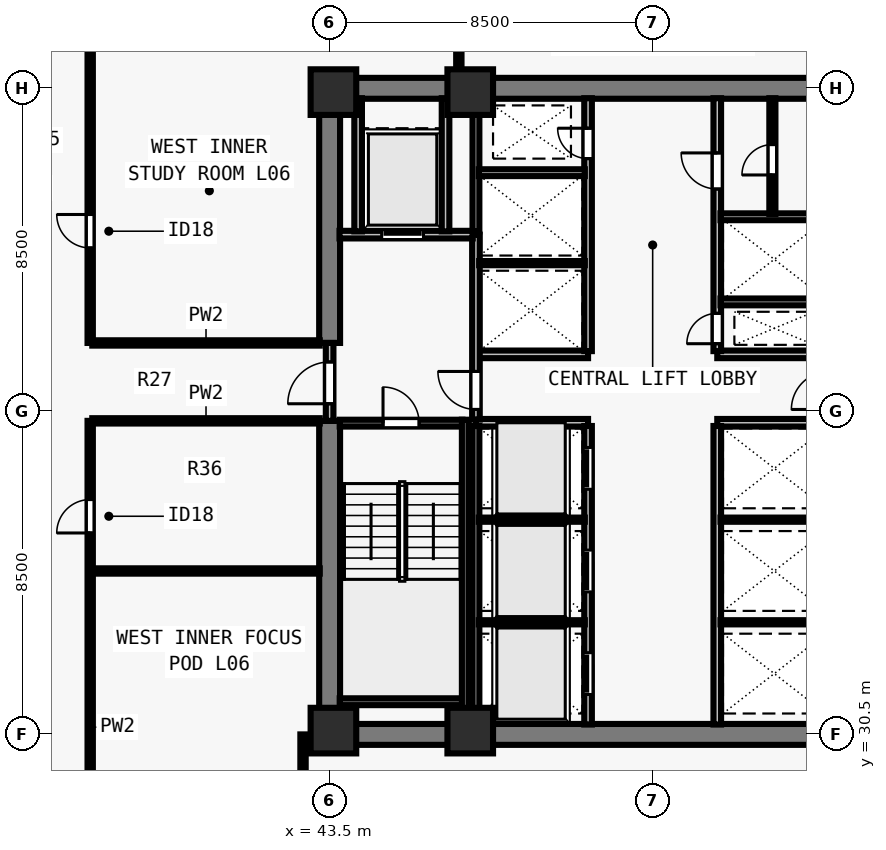
"""IFC4 building model, lengths in metres.
Left out: names, types, materials, properties, quantities, classifications, styles, units other than length and angle.
Written with IfcOpenShell. Run it as: python <this file> out.ifc"""

import sys

from ifc_helpers import new_model, si_unit, direction, frame, frame_2d, origin, origin_2d, place, context, subcontext, project, spatial, rectangle, extrude, element, fill, save


model = new_model("IFC4")
c1 = context("Model", 3, precision=1e-05, world=origin(), true_north=direction((0.0, 1.0)))
c2 = subcontext(c1, "Body", "Model", "MODEL_VIEW")
j1 = project(units=[si_unit("LENGTHUNIT", "METRE"), si_unit("PLANEANGLEUNIT", "RADIAN")], contexts=[c1])
p1 = place(None, origin())
s1 = spatial("IfcSite", under=j1, at=p1, CompositionType="ELEMENT")
p2 = place(p1, origin())
s2 = spatial("IfcBuilding", under=s1, at=p2, CompositionType="ELEMENT")
p3 = place(p2, frame((0.0, 0.0, 27.0)))
s3 = spatial("IfcBuildingStorey", under=s2, at=p3, CompositionType="ELEMENT", Elevation=27.0)
for number, where, z_axis, x_axis in (
    (1, (43.6, 30.6, 0.0), (0.0, 0.0, 1.0), (1.0, 0.0, 0.0)),
    (2, (47.2, 30.6, 0.0), (0.0, 0.0, 1.0), (1.0, 0.0, 0.0)),
    (3, (43.6, 47.4, 0.0), (0.0, 0.0, 1.0), (1.0, 0.0, 0.0)),
    (4, (47.2, 47.4, 0.0), (0.0, 0.0, 1.0), (1.0, 0.0, 0.0)),
):
    element("IfcColumn", number, at=place(p3, frame(where, z_axis=z_axis, x_axis=x_axis)), inside=s3, PredefinedType="COLUMN", context=c2, shape_type="SweptSolid", body=[
        extrude(rectangle(XDim=1.2, YDim=1.2, at=origin_2d()), origin(), (0.0, 0.0, 1.0), 3.5),
    ])
for number, where, z_axis, x_axis in (
    (5, (43.225, 30.5, 0.0), (0.0, 0.0, 1.0), (1.0, 0.0, 0.0)),
    (6, (43.225, 47.5, 0.0), (0.0, 0.0, 1.0), (1.0, 0.0, 0.0)),
):
    element("IfcWall", number, at=place(p3, frame(where, z_axis=z_axis, x_axis=x_axis)), inside=s3, PredefinedType="SHEAR", context=c2, shape_type="SweptSolid", body=[
        extrude(rectangle(XDim=17.55, YDim=0.55, at=frame_2d((8.775, 0.0))), origin(), (0.0, 0.0, 1.0), 3.28),
    ])
p4 = place(p3, frame((43.5, 30.765, 0.0), z_axis=(0.0, 0.0, 1.0), x_axis=(0.0, 1.0, 0.0)))
e7 = element("IfcWall", 7, at=p4, inside=s3, PredefinedType="SHEAR", context=c2, shape_type="SweptSolid", body=[
    extrude(rectangle(XDim=7.985, YDim=0.55, at=frame_2d((3.993, 0.0))), origin(), (0.0, 0.0, 1.0), 3.28),
])
p5 = place(p3, frame((43.5, 40.8, 0.0), z_axis=(0.0, 0.0, 1.0), x_axis=(0.0, 1.0, 0.0)))
e8 = element("IfcWall", 8, at=p5, inside=s3, PredefinedType="SHEAR", context=c2, shape_type="SweptSolid", body=[
    extrude(rectangle(XDim=6.435, YDim=0.55, at=frame_2d((3.218, 0.0))), origin(), (0.0, 0.0, 1.0), 3.28),
])
for number, where, z_axis, x_axis in (
    (9, (47.35, 38.7, 0.0), (0.0, 0.0, 1.0), (1.0, 0.0, 0.0)),
    (10, (47.35, 40.5, 0.0), (0.0, 0.0, 1.0), (1.0, 0.0, 0.0)),
    (11, (53.7, 38.7, 0.0), (0.0, 0.0, 1.0), (1.0, 0.0, 0.0)),
    (12, (53.7, 40.5, 0.0), (0.0, 0.0, 1.0), (1.0, 0.0, 0.0)),
):
    element("IfcWall", number, at=place(p3, frame(where, z_axis=z_axis, x_axis=x_axis)), inside=s3, PredefinedType="SOLIDWALL", context=c2, shape_type="SweptSolid", body=[
        extrude(rectangle(XDim=2.95, YDim=0.2, at=frame_2d((1.475, 0.0))), origin(), (0.0, 0.0, 1.0), 3.28),
    ])
p6 = place(p3, frame((50.3, 30.76, 0.0), z_axis=(0.0, 0.0, 1.0), x_axis=(0.0, 1.0, 0.0)))
e13 = element("IfcWall", 13, at=p6, inside=s3, PredefinedType="SOLIDWALL", context=c2, shape_type="SweptSolid", body=[
    extrude(rectangle(XDim=7.855, YDim=0.2, at=frame_2d((3.927, 0.0))), origin(), (0.0, 0.0, 1.0), 3.28),
])
p7 = place(p6, frame((0.79, 0.0, 0.0)))
e14 = element("IfcOpeningElement", 14, at=p7, cuts=e13, PredefinedType="OPENING", context=c2, shape_type="SweptSolid", body=[
    extrude(rectangle(XDim=1.1, YDim=2.2, at=frame_2d((0.55, 1.1))), frame((0.0, 0.11, 0.0), z_axis=(0.0, -1.0, 0.0), x_axis=(1.0, 0.0, 0.0)), (0.0, 0.0, 1.0), 0.22),
])
p8 = place(p6, frame((3.49, 0.0, 0.0)))
e15 = element("IfcOpeningElement", 15, at=p8, cuts=e13, PredefinedType="OPENING", context=c2, shape_type="SweptSolid", body=[
    extrude(rectangle(XDim=1.1, YDim=2.2, at=frame_2d((0.55, 1.1))), frame((0.0, 0.11, 0.0), z_axis=(0.0, -1.0, 0.0), x_axis=(1.0, 0.0, 0.0)), (0.0, 0.0, 1.0), 0.22),
])
p9 = place(p6, frame((6.19, 0.0, 0.0)))
e16 = element("IfcOpeningElement", 16, at=p9, cuts=e13, PredefinedType="OPENING", context=c2, shape_type="SweptSolid", body=[
    extrude(rectangle(XDim=1.1, YDim=2.2, at=frame_2d((0.55, 1.1))), frame((0.0, 0.11, 0.0), z_axis=(0.0, -1.0, 0.0), x_axis=(1.0, 0.0, 0.0)), (0.0, 0.0, 1.0), 0.22),
])
p10 = place(p3, frame((53.7, 30.76, 0.0), z_axis=(0.0, 0.0, 1.0), x_axis=(0.0, 1.0, 0.0)))
e17 = element("IfcWall", 17, at=p10, inside=s3, PredefinedType="SOLIDWALL", context=c2, shape_type="SweptSolid", body=[
    extrude(rectangle(XDim=7.855, YDim=0.2, at=frame_2d((3.927, 0.0))), origin(), (0.0, 0.0, 1.0), 3.28),
])
p11 = place(p3, frame((50.3, 40.585, 0.0), z_axis=(0.0, 0.0, 1.0), x_axis=(0.0, 1.0, 0.0)))
e18 = element("IfcWall", 18, at=p11, inside=s3, PredefinedType="SOLIDWALL", context=c2, shape_type="SweptSolid", body=[
    extrude(rectangle(XDim=6.655, YDim=0.2, at=frame_2d((3.328, 0.0))), origin(), (0.0, 0.0, 1.0), 3.28),
])
p12 = place(p11, frame((5.065, 0.0, 0.0)))
e19 = element("IfcOpeningElement", 19, at=p12, cuts=e18, PredefinedType="OPENING", context=c2, shape_type="SweptSolid", body=[
    extrude(rectangle(XDim=0.8, YDim=2.08, at=frame_2d((0.4, 1.04))), frame((0.0, 0.11, 0.0), z_axis=(0.0, -1.0, 0.0), x_axis=(1.0, 0.0, 0.0)), (0.0, 0.0, 1.0), 0.22),
])
p13 = place(p3, frame((53.7, 40.585, 0.0), z_axis=(0.0, 0.0, 1.0), x_axis=(0.0, 1.0, 0.0)))
e20 = element("IfcWall", 20, at=p13, inside=s3, PredefinedType="SOLIDWALL", context=c2, shape_type="SweptSolid", body=[
    extrude(rectangle(XDim=6.655, YDim=0.2, at=frame_2d((3.328, 0.0))), origin(), (0.0, 0.0, 1.0), 3.28),
])
p14 = place(p13, frame((0.195, 0.0, 0.0)))
e21 = element("IfcOpeningElement", 21, at=p14, cuts=e20, PredefinedType="OPENING", context=c2, shape_type="SweptSolid", body=[
    extrude(rectangle(XDim=0.8, YDim=2.08, at=frame_2d((0.4, 1.04))), frame((0.0, 0.11, 0.0), z_axis=(0.0, -1.0, 0.0), x_axis=(1.0, 0.0, 0.0)), (0.0, 0.0, 1.0), 0.22),
])
p15 = place(p13, frame((4.265, 0.0, 0.0)))
e22 = element("IfcOpeningElement", 22, at=p15, cuts=e20, PredefinedType="OPENING", context=c2, shape_type="SweptSolid", body=[
    extrude(rectangle(XDim=0.95, YDim=2.12, at=frame_2d((0.475, 1.06))), frame((0.0, 0.11, 0.0), z_axis=(0.0, -1.0, 0.0), x_axis=(1.0, 0.0, 0.0)), (0.0, 0.0, 1.0), 0.22),
])
p16 = place(p3, frame((43.5, 38.75, 0.0), z_axis=(0.0, 0.0, 1.0), x_axis=(0.0, 1.0, 0.0)))
e23 = element("IfcWall", 23, at=p16, inside=s3, PredefinedType="SOLIDWALL", context=c2, shape_type="SweptSolid", body=[
    extrude(rectangle(XDim=2.05, YDim=0.2, at=frame_2d((1.025, 0.0))), origin(), (0.0, 0.0, 1.0), 3.28),
])
p17 = place(p16, frame((0.45, 0.0, 0.0)))
e24 = element("IfcOpeningElement", 24, at=p17, cuts=e23, PredefinedType="OPENING", context=c2, shape_type="SweptSolid", body=[
    extrude(rectangle(XDim=1.1, YDim=2.15, at=frame_2d((0.55, 1.075))), frame((0.0, 0.11, 0.0), z_axis=(0.0, -1.0, 0.0), x_axis=(1.0, 0.0, 0.0)), (0.0, 0.0, 1.0), 0.22),
])
p18 = place(p3, frame((47.35, 38.785, 0.0), z_axis=(0.0, 0.0, 1.0), x_axis=(0.0, 1.0, 0.0)))
e25 = element("IfcWall", 25, at=p18, inside=s3, PredefinedType="SOLIDWALL", context=c2, shape_type="SweptSolid", body=[
    extrude(rectangle(XDim=4.865, YDim=0.2, at=frame_2d((2.433, 0.0))), origin(), (0.0, 0.0, 1.0), 3.28),
])
p19 = place(p18, frame((0.265, 0.0, 0.0)))
e26 = element("IfcOpeningElement", 26, at=p19, cuts=e25, PredefinedType="OPENING", context=c2, shape_type="SweptSolid", body=[
    extrude(rectangle(XDim=1.0, YDim=2.15, at=frame_2d((0.5, 1.075))), frame((0.0, 0.11, 0.0), z_axis=(0.0, -1.0, 0.0), x_axis=(1.0, 0.0, 0.0)), (0.0, 0.0, 1.0), 0.22),
])
p20 = place(p3, frame((43.76, 43.65, 0.0), z_axis=(0.0, 0.0, 1.0), x_axis=(1.0, 0.0, 0.0)))
e27 = element("IfcWall", 27, at=p20, inside=s3, PredefinedType="SOLIDWALL", context=c2, shape_type="SweptSolid", body=[
    extrude(rectangle(XDim=3.505, YDim=0.2, at=frame_2d((1.752, 0.0))), origin(), (0.0, 0.0, 1.0), 3.28),
])
p21 = place(p20, frame((1.11, 0.0, 0.0)))
e28 = element("IfcOpeningElement", 28, at=p21, cuts=e27, PredefinedType="OPENING", context=c2, shape_type="SweptSolid", body=[
    extrude(rectangle(XDim=1.1, YDim=2.2, at=frame_2d((0.55, 1.1))), frame((0.0, 0.11, 0.0), z_axis=(0.0, -1.0, 0.0), x_axis=(1.0, 0.0, 0.0)), (0.0, 0.0, 1.0), 0.22),
])
for number, where, z_axis, x_axis in (
    (29, (46.55, 43.735, 0.0), (0.0, 0.0, 1.0), (0.0, 1.0, 0.0)),
    (30, (44.25, 43.735, 0.0), (0.0, 0.0, 1.0), (0.0, 1.0, 0.0)),
):
    element("IfcWall", number, at=place(p3, frame(where, z_axis=z_axis, x_axis=x_axis)), inside=s3, PredefinedType="SOLIDWALL", context=c2, shape_type="SweptSolid", body=[
        extrude(rectangle(XDim=3.505, YDim=0.2, at=frame_2d((1.752, 0.0))), origin(), (0.0, 0.0, 1.0), 3.28),
    ])
p22 = place(p3, frame((47.35, 30.76, 0.0), z_axis=(0.0, 0.0, 1.0), x_axis=(0.0, 1.0, 0.0)))
e31 = element("IfcWall", 31, at=p22, inside=s3, PredefinedType="SOLIDWALL", context=c2, shape_type="SweptSolid", body=[
    extrude(rectangle(XDim=7.855, YDim=0.18, at=frame_2d((3.927, 0.0))), origin(), (0.0, 0.0, 1.0), 3.28),
])
for number, where, z_axis, x_axis in (
    (32, (47.425, 33.45, 0.0), (0.0, 0.0, 1.0), (1.0, 0.0, 0.0)),
    (33, (47.425, 36.15, 0.0), (0.0, 0.0, 1.0), (1.0, 0.0, 0.0)),
    (34, (53.785, 33.45, 0.0), (0.0, 0.0, 1.0), (1.0, 0.0, 0.0)),
    (35, (53.785, 36.15, 0.0), (0.0, 0.0, 1.0), (1.0, 0.0, 0.0)),
):
    element("IfcWall", number, at=place(p3, frame(where, z_axis=z_axis, x_axis=x_axis)), inside=s3, PredefinedType="PARTITIONING", context=c2, shape_type="SweptSolid", body=[
        extrude(rectangle(XDim=2.79, YDim=0.11, at=frame_2d((1.395, 0.0))), origin(), (0.0, 0.0, 1.0), 3.28),
    ])
p23 = place(p3, frame((47.35, 43.735, 0.0), z_axis=(0.0, 0.0, 1.0), x_axis=(0.0, 1.0, 0.0)))
e36 = element("IfcWall", 36, at=p23, inside=s3, PredefinedType="SOLIDWALL", context=c2, shape_type="SweptSolid", body=[
    extrude(rectangle(XDim=3.505, YDim=0.18, at=frame_2d((1.752, 0.0))), origin(), (0.0, 0.0, 1.0), 3.28),
])
p24 = place(p3, frame((47.435, 42.9, 0.0), z_axis=(0.0, 0.0, 1.0), x_axis=(1.0, 0.0, 0.0)))
e37 = element("IfcWall", 37, at=p24, inside=s3, PredefinedType="PARTITIONING", context=c2, shape_type="SweptSolid", body=[
    extrude(rectangle(XDim=2.78, YDim=0.11, at=frame_2d((1.39, 0.0))), origin(), (0.0, 0.0, 1.0), 3.28),
])
p25 = place(p3, frame((47.425, 45.28, 0.0), z_axis=(0.0, 0.0, 1.0), x_axis=(1.0, 0.0, 0.0)))
e38 = element("IfcWall", 38, at=p25, inside=s3, PredefinedType="SOLIDWALL", context=c2, shape_type="SweptSolid", body=[
    extrude(rectangle(XDim=2.79, YDim=0.18, at=frame_2d((1.395, 0.0))), origin(), (0.0, 0.0, 1.0), 3.28),
])
p26 = place(p3, frame((53.785, 41.88, 0.0), z_axis=(0.0, 0.0, 1.0), x_axis=(1.0, 0.0, 0.0)))
e39 = element("IfcWall", 39, at=p26, inside=s3, PredefinedType="SOLIDWALL", context=c2, shape_type="SweptSolid", body=[
    extrude(rectangle(XDim=2.78, YDim=0.18, at=frame_2d((1.39, 0.0))), origin(), (0.0, 0.0, 1.0), 3.28),
])
p27 = place(p3, frame((53.785, 44.12, 0.0), z_axis=(0.0, 0.0, 1.0), x_axis=(1.0, 0.0, 0.0)))
e40 = element("IfcWall", 40, at=p27, inside=s3, PredefinedType="SOLIDWALL", context=c2, shape_type="SweptSolid", body=[
    extrude(rectangle(XDim=2.79, YDim=0.18, at=frame_2d((1.395, 0.0))), origin(), (0.0, 0.0, 1.0), 3.28),
])
p28 = place(p3, frame((55.15, 44.195, 0.0), z_axis=(0.0, 0.0, 1.0), x_axis=(0.0, 1.0, 0.0)))
e41 = element("IfcWall", 41, at=p28, inside=s3, PredefinedType="PARTITIONING", context=c2, shape_type="SweptSolid", body=[
    extrude(rectangle(XDim=3.045, YDim=0.16, at=frame_2d((1.522, 0.0))), origin(), (0.0, 0.0, 1.0), 3.28),
])
p29 = place(p28, frame((1.025, 0.0, 0.0)))
e42 = element("IfcOpeningElement", 42, at=p29, cuts=e41, PredefinedType="OPENING", context=c2, shape_type="SweptSolid", body=[
    extrude(rectangle(XDim=0.8, YDim=2.1, at=frame_2d((0.4, 1.05))), frame((0.0, 0.09, 0.0), z_axis=(0.0, -1.0, 0.0), x_axis=(1.0, 0.0, 0.0)), (0.0, 0.0, 1.0), 0.18),
])
p30 = place(p3, frame((37.2, 23.655, 0.0), z_axis=(0.0, 0.0, 1.0), x_axis=(0.0, 1.0, 0.0)))
e43 = element("IfcWall", 43, at=p30, inside=s3, PredefinedType="PARTITIONING", context=c2, shape_type="SweptSolid", body=[
    extrude(rectangle(XDim=15.095, YDim=0.14, at=frame_2d((7.547, 0.0))), origin(), (0.0, 0.0, 1.0), 3.28),
])
p31 = place(p30, frame((1.045, 0.0, 0.0)))
e44 = element("IfcOpeningElement", 44, at=p31, cuts=e43, PredefinedType="OPENING", context=c2, shape_type="SweptSolid", body=[
    extrude(rectangle(XDim=0.88, YDim=2.1, at=frame_2d((0.44, 1.05))), frame((0.0, 0.08, 0.0), z_axis=(0.0, -1.0, 0.0), x_axis=(1.0, 0.0, 0.0)), (0.0, 0.0, 1.0), 0.16),
])
p32 = place(p30, frame((12.145, 0.0, 0.0)))
e45 = element("IfcOpeningElement", 45, at=p32, cuts=e43, PredefinedType="OPENING", context=c2, shape_type="SweptSolid", body=[
    extrude(rectangle(XDim=0.88, YDim=2.1, at=frame_2d((0.44, 1.05))), frame((0.0, 0.08, 0.0), z_axis=(0.0, -1.0, 0.0), x_axis=(1.0, 0.0, 0.0)), (0.0, 0.0, 1.0), 0.16),
])
p33 = place(p3, frame((37.2, 40.8, 0.0), z_axis=(0.0, 0.0, 1.0), x_axis=(0.0, 1.0, 0.0)))
e46 = element("IfcWall", 46, at=p33, inside=s3, PredefinedType="PARTITIONING", context=c2, shape_type="SweptSolid", body=[
    extrude(rectangle(XDim=13.545, YDim=0.14, at=frame_2d((6.772, 0.0))), origin(), (0.0, 0.0, 1.0), 3.28),
])
p34 = place(p33, frame((2.5, 0.0, 0.0)))
e47 = element("IfcOpeningElement", 47, at=p34, cuts=e46, PredefinedType="OPENING", context=c2, shape_type="SweptSolid", body=[
    extrude(rectangle(XDim=0.88, YDim=2.1, at=frame_2d((0.44, 1.05))), frame((0.0, 0.08, 0.0), z_axis=(0.0, -1.0, 0.0), x_axis=(1.0, 0.0, 0.0)), (0.0, 0.0, 1.0), 0.16),
])
for number, where, z_axis, x_axis in (
    (48, (37.255, 38.75, 0.0), (0.0, 0.0, 1.0), (1.0, 0.0, 0.0)),
    (49, (37.255, 40.8, 0.0), (0.0, 0.0, 1.0), (1.0, 0.0, 0.0)),
):
    element("IfcWall", number, at=place(p3, frame(where, z_axis=z_axis, x_axis=x_axis)), inside=s3, PredefinedType="PARTITIONING", context=c2, shape_type="SweptSolid", body=[
        extrude(rectangle(XDim=5.985, YDim=0.14, at=frame_2d((2.993, 0.0))), origin(), (0.0, 0.0, 1.0), 3.28),
    ])
p35 = place(p3, frame((42.8, 23.655, 0.0), z_axis=(0.0, 0.0, 1.0), x_axis=(0.0, 1.0, 0.0)))
e50 = element("IfcWall", 50, at=p35, inside=s3, PredefinedType="PARTITIONING", context=c2, shape_type="SweptSolid", body=[
    extrude(rectangle(XDim=6.845, YDim=0.14, at=frame_2d((3.422, 0.0))), origin(), (0.0, 0.0, 1.0), 2.439),
])
p36 = place(p3, frame((46.9, 47.76, 0.0), z_axis=(0.0, 0.0, 1.0), x_axis=(0.0, 1.0, 0.0)))
e51 = element("IfcWall", 51, at=p36, inside=s3, PredefinedType="PARTITIONING", context=c2, shape_type="SweptSolid", body=[
    extrude(rectangle(XDim=6.585, YDim=0.14, at=frame_2d((3.292, 0.0))), origin(), (0.0, 0.0, 1.0), 3.28),
])
p37 = place(p3, frame((37.255, 34.8, 0.0), z_axis=(0.0, 0.0, 1.0), x_axis=(1.0, 0.0, 0.0)))
e52 = element("IfcWall", 52, at=p37, inside=s3, PredefinedType="PARTITIONING", context=c2, shape_type="SweptSolid", body=[
    extrude(rectangle(XDim=5.985, YDim=0.14, at=frame_2d((2.993, 0.0))), origin(), (0.0, 0.0, 1.0), 3.28),
])
p38 = place(p3, frame((43.765, 38.69, 0.0), z_axis=(0.0, 0.0, 1.0), x_axis=(1.0, 0.0, 0.0)))
e53 = element("IfcWall", 53, at=p38, inside=s3, PredefinedType="SOLIDWALL", context=c2, shape_type="SweptSolid", body=[
    extrude(rectangle(XDim=3.23, YDim=0.18, at=frame_2d((1.615, 0.0))), origin(), (0.0, 0.0, 1.0), 3.28),
])
p39 = place(p38, frame((1.14, 0.0, 0.0)))
e54 = element("IfcOpeningElement", 54, at=p39, cuts=e53, PredefinedType="OPENING", context=c2, shape_type="SweptSolid", body=[
    extrude(rectangle(XDim=0.95, YDim=2.15, at=frame_2d((0.475, 1.075))), frame((0.0, 0.1, 0.0), z_axis=(0.0, -1.0, 0.0), x_axis=(1.0, 0.0, 0.0)), (0.0, 0.0, 1.0), 0.2),
])
p40 = place(p3, frame((43.765, 31.36, 0.0), z_axis=(0.0, 0.0, 1.0), x_axis=(1.0, 0.0, 0.0)))
e55 = element("IfcWall", 55, at=p40, inside=s3, PredefinedType="SOLIDWALL", context=c2, shape_type="SweptSolid", body=[
    extrude(rectangle(XDim=3.23, YDim=0.18, at=frame_2d((1.615, 0.0))), origin(), (0.0, 0.0, 1.0), 3.28),
])
p41 = place(p3, frame((47.07, 38.78, 0.0), z_axis=(0.0, 0.0, 1.0), x_axis=(0.0, -1.0, 0.0)))
e56 = element("IfcWall", 56, at=p41, inside=s3, PredefinedType="SOLIDWALL", context=c2, shape_type="SweptSolid", body=[
    extrude(rectangle(XDim=8.017, YDim=0.18, at=frame_2d((4.009, 0.0))), origin(), (0.0, 0.0, 1.0), 3.28),
])
p42 = place(p17, origin())
e57 = element("IfcDoor", 57, at=p42, inside=s3, OperationType="SINGLE_SWING_LEFT", PredefinedType="DOOR", context=c2, shape_type="SweptSolid", body=[
    extrude(rectangle(XDim=1.1, YDim=2.15, at=frame_2d((0.55, 1.075))), frame((0.0, 0.025, 0.0), z_axis=(0.0, -1.0, 0.0), x_axis=(1.0, 0.0, 0.0)), (0.0, 0.0, 1.0), 0.05),
])
fill(e24, e57)
p43 = place(p19, origin())
e58 = element("IfcDoor", 58, at=p43, inside=s3, OperationType="SINGLE_SWING_RIGHT", PredefinedType="DOOR", context=c2, shape_type="SweptSolid", body=[
    extrude(rectangle(XDim=1.0, YDim=2.15, at=frame_2d((0.5, 1.075))), frame((0.0, 0.025, 0.0), z_axis=(0.0, -1.0, 0.0), x_axis=(1.0, 0.0, 0.0)), (0.0, 0.0, 1.0), 0.05),
])
fill(e26, e58)
p44 = place(p21, origin())
e59 = element("IfcDoor", 59, at=p44, inside=s3, OperationType="SLIDING_TO_LEFT", PredefinedType="DOOR", context=c2, shape_type="SweptSolid", body=[
    extrude(rectangle(XDim=1.1, YDim=2.2, at=frame_2d((0.55, 1.1))), frame((0.0, 0.025, 0.0), z_axis=(0.0, -1.0, 0.0), x_axis=(1.0, 0.0, 0.0)), (0.0, 0.0, 1.0), 0.05),
])
fill(e28, e59)
p45 = place(p7, origin())
e60 = element("IfcDoor", 60, at=p45, inside=s3, OperationType="SLIDING_TO_LEFT", PredefinedType="DOOR", context=c2, shape_type="SweptSolid", body=[
    extrude(rectangle(XDim=1.1, YDim=2.2, at=frame_2d((0.55, 1.1))), frame((0.0, 0.025, 0.0), z_axis=(0.0, -1.0, 0.0), x_axis=(1.0, 0.0, 0.0)), (0.0, 0.0, 1.0), 0.05),
])
fill(e14, e60)
p46 = place(p8, origin())
e61 = element("IfcDoor", 61, at=p46, inside=s3, OperationType="SLIDING_TO_LEFT", PredefinedType="DOOR", context=c2, shape_type="SweptSolid", body=[
    extrude(rectangle(XDim=1.1, YDim=2.2, at=frame_2d((0.55, 1.1))), frame((0.0, 0.025, 0.0), z_axis=(0.0, -1.0, 0.0), x_axis=(1.0, 0.0, 0.0)), (0.0, 0.0, 1.0), 0.05),
])
fill(e15, e61)
p47 = place(p9, origin())
e62 = element("IfcDoor", 62, at=p47, inside=s3, OperationType="SLIDING_TO_LEFT", PredefinedType="DOOR", context=c2, shape_type="SweptSolid", body=[
    extrude(rectangle(XDim=1.1, YDim=2.2, at=frame_2d((0.55, 1.1))), frame((0.0, 0.025, 0.0), z_axis=(0.0, -1.0, 0.0), x_axis=(1.0, 0.0, 0.0)), (0.0, 0.0, 1.0), 0.05),
])
fill(e16, e62)
p48 = place(p12, origin())
e63 = element("IfcDoor", 63, at=p48, inside=s3, OperationType="SINGLE_SWING_RIGHT", PredefinedType="DOOR", context=c2, shape_type="SweptSolid", body=[
    extrude(rectangle(XDim=0.8, YDim=2.08, at=frame_2d((0.4, 1.04))), frame((0.0, 0.025, 0.0), z_axis=(0.0, -1.0, 0.0), x_axis=(1.0, 0.0, 0.0)), (0.0, 0.0, 1.0), 0.05),
])
fill(e19, e63)
p49 = place(p14, origin())
e64 = element("IfcDoor", 64, at=p49, inside=s3, OperationType="SINGLE_SWING_LEFT", PredefinedType="DOOR", context=c2, shape_type="SweptSolid", body=[
    extrude(rectangle(XDim=0.8, YDim=2.08, at=frame_2d((0.4, 1.04))), frame((0.0, 0.025, 0.0), z_axis=(0.0, -1.0, 0.0), x_axis=(1.0, 0.0, 0.0)), (0.0, 0.0, 1.0), 0.05),
])
fill(e21, e64)
p50 = place(p15, origin())
e65 = element("IfcDoor", 65, at=p50, inside=s3, OperationType="SINGLE_SWING_RIGHT", PredefinedType="DOOR", context=c2, shape_type="SweptSolid", body=[
    extrude(rectangle(XDim=0.95, YDim=2.12, at=frame_2d((0.475, 1.06))), frame((0.0, 0.025, 0.0), z_axis=(0.0, -1.0, 0.0), x_axis=(1.0, 0.0, 0.0)), (0.0, 0.0, 1.0), 0.05),
])
fill(e22, e65)
p51 = place(p29, origin())
e66 = element("IfcDoor", 66, at=p51, inside=s3, OperationType="SINGLE_SWING_LEFT", PredefinedType="DOOR", context=c2, shape_type="SweptSolid", body=[
    extrude(rectangle(XDim=0.8, YDim=2.1, at=frame_2d((0.4, 1.05))), frame((0.0, 0.025, 0.0), z_axis=(0.0, -1.0, 0.0), x_axis=(1.0, 0.0, 0.0)), (0.0, 0.0, 1.0), 0.05),
])
fill(e42, e66)
p52 = place(p32, origin())
e67 = element("IfcDoor", 67, at=p52, inside=s3, OperationType="SINGLE_SWING_LEFT", PredefinedType="DOOR", context=c2, shape_type="SweptSolid", body=[
    extrude(rectangle(XDim=0.88, YDim=2.1, at=frame_2d((0.44, 1.05))), frame((0.0, 0.025, 0.0), z_axis=(0.0, -1.0, 0.0), x_axis=(1.0, 0.0, 0.0)), (0.0, 0.0, 1.0), 0.05),
])
fill(e45, e67)
p53 = place(p34, origin())
e68 = element("IfcDoor", 68, at=p53, inside=s3, OperationType="SINGLE_SWING_RIGHT", PredefinedType="DOOR", context=c2, shape_type="SweptSolid", body=[
    extrude(rectangle(XDim=0.88, YDim=2.1, at=frame_2d((0.44, 1.05))), frame((0.0, 0.025, 0.0), z_axis=(0.0, -1.0, 0.0), x_axis=(1.0, 0.0, 0.0)), (0.0, 0.0, 1.0), 0.05),
])
fill(e47, e68)
p54 = place(p39, origin())
e69 = element("IfcDoor", 69, at=p54, inside=s3, OperationType="SINGLE_SWING_LEFT", PredefinedType="DOOR", context=c2, shape_type="SweptSolid", body=[
    extrude(rectangle(XDim=0.95, YDim=2.15, at=frame_2d((0.475, 1.075))), frame((0.0, 0.025, 0.0), z_axis=(0.0, -1.0, 0.0), x_axis=(1.0, 0.0, 0.0)), (0.0, 0.0, 1.0), 0.05),
])
fill(e54, e69)
save(model, sys.argv[1])
